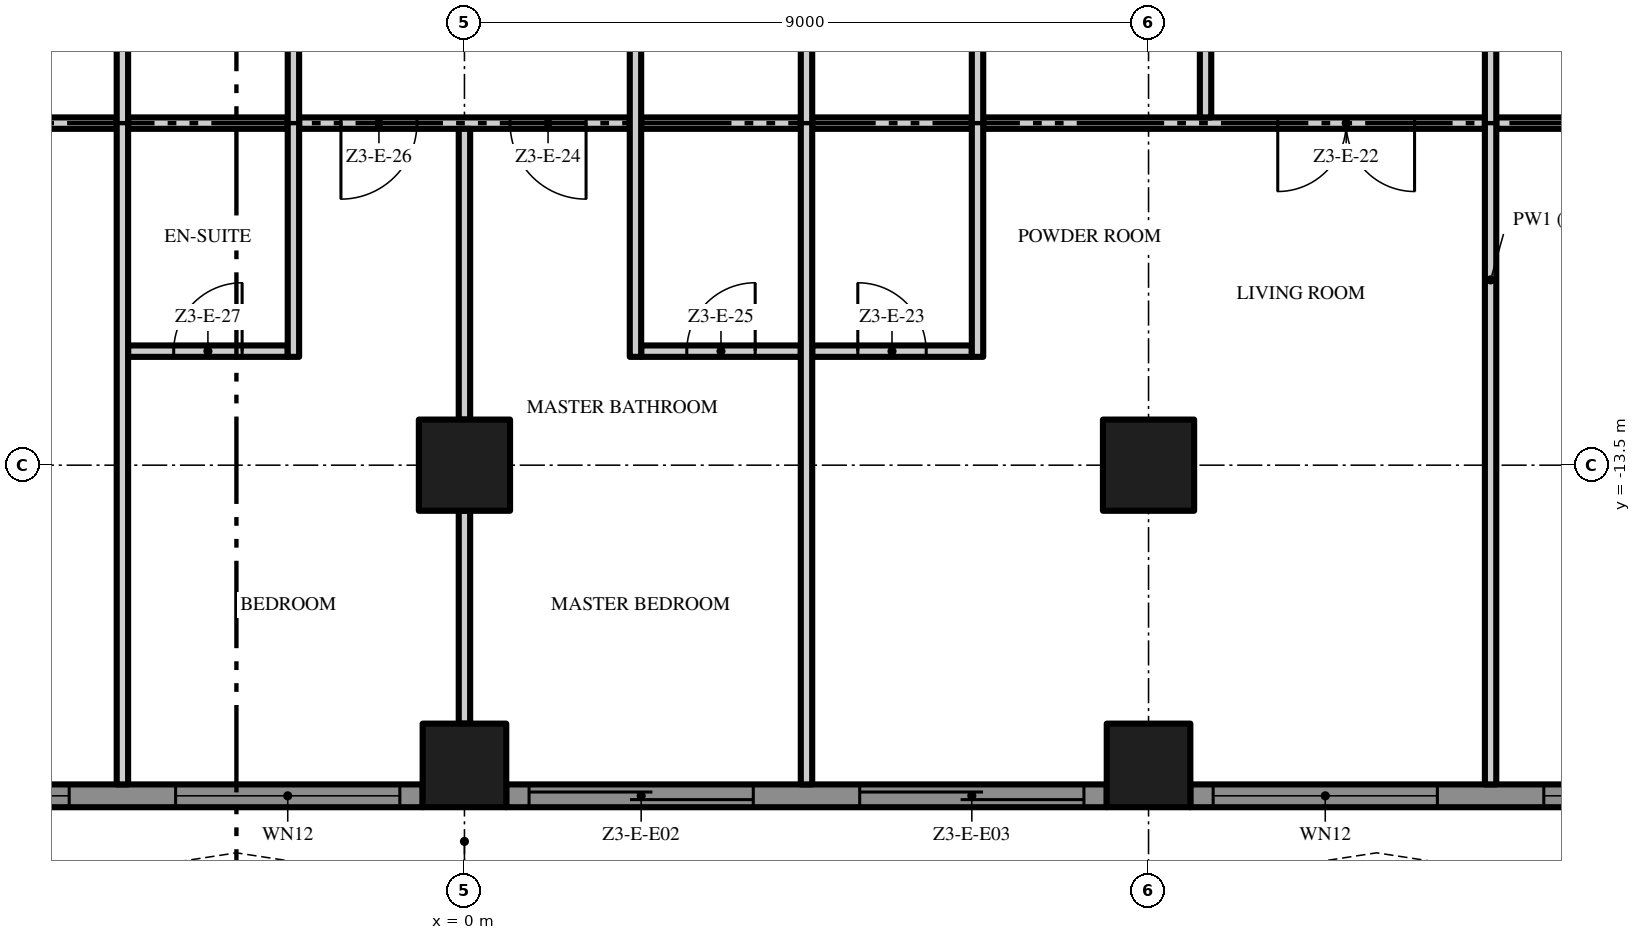
"""IFC4 building model, lengths in metres.
Left out: names, types, materials, properties, quantities, classifications, styles, units other than length and angle.
Written with IfcOpenShell. Run it as: python <this file> out.ifc"""

import sys

from ifc_helpers import new_model, si_unit, direction, frame, frame_2d, origin, origin_2d, place, context, subcontext, project, spatial, polyline, rectangle, outline, extrude, element, fill, save


model = new_model("IFC4")
c1 = context("Model", 3, precision=1e-05, world=origin(), true_north=direction((0.0, 1.0)))
c2 = subcontext(c1, "Body", "Model", "MODEL_VIEW")
j1 = project(units=[si_unit("LENGTHUNIT", "METRE"), si_unit("PLANEANGLEUNIT", "RADIAN")], contexts=[c1])
p1 = place(None, origin())
s1 = spatial("IfcSite", under=j1, at=p1, CompositionType="ELEMENT")
p2 = place(p1, origin())
s2 = spatial("IfcBuilding", under=s1, at=p2, CompositionType="ELEMENT")
p3 = place(p2, frame((0.0, 0.0, 166.8)))
s3 = spatial("IfcBuildingStorey", under=s2, at=p3, CompositionType="ELEMENT", Elevation=166.8)
p4 = place(p3, frame((0.0, -13.5, 0.0), z_axis=(0.0, 0.0, 1.0), x_axis=(1.0, 0.0, 0.0)))
e1 = element("IfcColumn", 1, at=p4, inside=s3, PredefinedType="COLUMN", context=c2, shape_type="SweptSolid", body=[
    extrude(rectangle(XDim=1.2, YDim=1.2, at=origin_2d()), origin(), (0.0, 0.0, 1.0), 3.5),
])
p5 = place(p3, frame((0.0, -17.45, 0.0), z_axis=(0.0, 0.0, 1.0), x_axis=(1.0, 0.0, 0.0)))
e2 = element("IfcColumn", 2, at=p5, inside=s3, PredefinedType="COLUMN", context=c2, shape_type="SweptSolid", body=[
    extrude(rectangle(XDim=1.1, YDim=1.1, at=origin_2d()), origin(), (0.0, 0.0, 1.0), 3.5),
])
p6 = place(p3, frame((9.0, -13.5, 0.0), z_axis=(0.0, 0.0, 1.0), x_axis=(1.0, 0.0, 0.0)))
e3 = element("IfcColumn", 3, at=p6, inside=s3, PredefinedType="COLUMN", context=c2, shape_type="SweptSolid", body=[
    extrude(rectangle(XDim=1.2, YDim=1.2, at=origin_2d()), origin(), (0.0, 0.0, 1.0), 3.5),
])
p7 = place(p3, frame((9.0, -17.45, 0.0), z_axis=(0.0, 0.0, 1.0), x_axis=(1.0, 0.0, 0.0)))
e4 = element("IfcColumn", 4, at=p7, inside=s3, PredefinedType="COLUMN", context=c2, shape_type="SweptSolid", body=[
    extrude(rectangle(XDim=1.1, YDim=1.1, at=origin_2d()), origin(), (0.0, 0.0, 1.0), 3.5),
])
p8 = place(p3, frame((-0.55, -17.85, 0.0), z_axis=(0.0, 0.0, 1.0), x_axis=(-1.0, 0.0, 0.0)))
e5 = element("IfcWall", 5, at=p8, inside=s3, PredefinedType="SOLIDWALL", context=c2, shape_type="SweptSolid", body=[
    extrude(rectangle(XDim=7.9, YDim=0.3, at=frame_2d((3.95, 0.0))), origin(), (0.0, 0.0, 1.0), 3.5),
])
p9 = place(p8, frame((4.65, 0.0, 0.45)))
e6 = element("IfcOpeningElement", 6, at=p9, cuts=e5, PredefinedType="OPENING", context=c2, shape_type="SweptSolid", body=[
    extrude(rectangle(XDim=2.95, YDim=2.65, at=frame_2d((1.475, 1.325))), frame((0.0, 0.16, 0.0), z_axis=(0.0, -1.0, 0.0), x_axis=(1.0, 0.0, 0.0)), (0.0, 0.0, 1.0), 0.32),
])
p10 = place(p8, frame((0.3, 0.0, 0.45)))
e7 = element("IfcOpeningElement", 7, at=p10, cuts=e5, PredefinedType="OPENING", context=c2, shape_type="SweptSolid", body=[
    extrude(rectangle(XDim=2.95, YDim=2.65, at=frame_2d((1.475, 1.325))), frame((0.0, 0.16, 0.0), z_axis=(0.0, -1.0, 0.0), x_axis=(1.0, 0.0, 0.0)), (0.0, 0.0, 1.0), 0.32),
])
p11 = place(p3, frame((8.45, -17.85, 0.0), z_axis=(0.0, 0.0, 1.0), x_axis=(-1.0, 0.0, 0.0)))
e8 = element("IfcWall", 8, at=p11, inside=s3, PredefinedType="SOLIDWALL", context=c2, shape_type="SweptSolid", body=[
    extrude(rectangle(XDim=7.9, YDim=0.3, at=frame_2d((3.95, 0.0))), origin(), (0.0, 0.0, 1.0), 3.5),
])
p12 = place(p11, frame((4.65, 0.0, 0.0)))
e9 = element("IfcOpeningElement", 9, at=p12, cuts=e8, PredefinedType="OPENING", context=c2, shape_type="SweptSolid", body=[
    extrude(rectangle(XDim=2.95, YDim=2.4, at=frame_2d((1.475, 1.2))), frame((0.0, 0.16, 0.0), z_axis=(0.0, -1.0, 0.0), x_axis=(1.0, 0.0, 0.0)), (0.0, 0.0, 1.0), 0.32),
])
p13 = place(p11, frame((0.3, 0.0, 0.0)))
e10 = element("IfcOpeningElement", 10, at=p13, cuts=e8, PredefinedType="OPENING", context=c2, shape_type="SweptSolid", body=[
    extrude(rectangle(XDim=2.95, YDim=2.4, at=frame_2d((1.475, 1.2))), frame((0.0, 0.16, 0.0), z_axis=(0.0, -1.0, 0.0), x_axis=(1.0, 0.0, 0.0)), (0.0, 0.0, 1.0), 0.32),
])
p14 = place(p3, frame((16.9, -17.85, 0.0), z_axis=(0.0, 0.0, 1.0), x_axis=(-1.0, 0.0, 0.0)))
e11 = element("IfcWall", 11, at=p14, inside=s3, PredefinedType="SOLIDWALL", context=c2, shape_type="SweptSolid", body=[
    extrude(rectangle(XDim=7.35, YDim=0.3, at=frame_2d((3.675, 0.0))), origin(), (0.0, 0.0, 1.0), 3.5),
])
p15 = place(p14, frame((4.1, 0.0, 0.45)))
e12 = element("IfcOpeningElement", 12, at=p15, cuts=e11, PredefinedType="OPENING", context=c2, shape_type="SweptSolid", body=[
    extrude(rectangle(XDim=2.95, YDim=2.65, at=frame_2d((1.475, 1.325))), frame((0.0, 0.16, 0.0), z_axis=(0.0, -1.0, 0.0), x_axis=(1.0, 0.0, 0.0)), (0.0, 0.0, 1.0), 0.32),
])
p16 = place(p14, frame((0.3, 0.0, 0.45)))
e13 = element("IfcOpeningElement", 13, at=p16, cuts=e11, PredefinedType="OPENING", context=c2, shape_type="SweptSolid", body=[
    extrude(rectangle(XDim=2.4, YDim=2.65, at=frame_2d((1.2, 1.325))), frame((0.0, 0.16, 0.0), z_axis=(0.0, -1.0, 0.0), x_axis=(1.0, 0.0, 0.0)), (0.0, 0.0, 1.0), 0.32),
])
p17 = place(p3, origin())
e14 = element("IfcWall", 14, at=p17, inside=s3, PredefinedType="USERDEFINED", context=c2, shape_type="SweptSolid", body=[
    extrude(outline(polyline([(-18.0, -18.6), (-16.5, -18.829), (-15.0, -19.429), (-13.5, -20.171), (-12.0, -20.771), (-10.5, -21.0), (-9.0, -20.771), (-7.5, -20.171), (-6.0, -19.429), (-4.5, -18.829), (-3.0, -18.6), (-1.5, -18.829), (0.0, -19.429), (1.5, -20.171), (3.0, -20.771), (4.5, -21.0), (6.0, -20.771), (7.5, -20.171), (9.0, -19.429), (10.5, -18.829), (12.0, -18.6), (13.5, -18.829), (15.0, -19.429), (16.5, -20.171), (18.0, -20.771), (18.093, -20.539), (16.602, -19.942), (15.102, -19.201), (13.566, -18.586), (12.0, -18.347), (10.434, -18.586), (8.898, -19.201), (7.398, -19.942), (5.934, -20.528), (4.5, -20.747), (3.066, -20.528), (1.602, -19.942), (0.102, -19.201), (-1.434, -18.586), (-3.0, -18.347), (-4.566, -18.586), (-6.102, -19.201), (-7.602, -19.942), (-9.066, -20.528), (-10.5, -20.747), (-11.934, -20.528), (-13.398, -19.942), (-14.898, -19.201), (-16.434, -18.586), (-17.962, -18.353), (-18.0, -18.6)])), origin(), (0.0, 0.0, 1.0), 0.9),
])
p18 = place(p3, frame((-4.425, -12.0, 0.0), z_axis=(0.0, 0.0, 1.0), x_axis=(1.0, 0.0, 0.0)))
e15 = element("IfcWall", 15, at=p18, inside=s3, PredefinedType="PARTITIONING", context=c2, shape_type="SweptSolid", body=[
    extrude(rectangle(XDim=2.1, YDim=0.15, at=frame_2d((1.05, 0.0))), origin(), (0.0, 0.0, 1.0), 3.5),
])
p19 = place(p18, frame((0.6, 0.0, 0.0)))
e16 = element("IfcOpeningElement", 16, at=p19, cuts=e15, PredefinedType="OPENING", context=c2, shape_type="SweptSolid", body=[
    extrude(rectangle(XDim=0.9, YDim=2.1, at=frame_2d((0.45, 1.05))), frame((0.0, 0.085, 0.0), z_axis=(0.0, -1.0, 0.0), x_axis=(1.0, 0.0, 0.0)), (0.0, 0.0, 1.0), 0.17),
])
p20 = place(p3, frame((2.325, -12.0, 0.0), z_axis=(0.0, 0.0, 1.0), x_axis=(1.0, 0.0, 0.0)))
e17 = element("IfcWall", 17, at=p20, inside=s3, PredefinedType="PARTITIONING", context=c2, shape_type="SweptSolid", body=[
    extrude(rectangle(XDim=2.1, YDim=0.15, at=frame_2d((1.05, 0.0))), origin(), (0.0, 0.0, 1.0), 3.5),
])
p21 = place(p20, frame((0.6, 0.0, 0.0)))
e18 = element("IfcOpeningElement", 18, at=p21, cuts=e17, PredefinedType="OPENING", context=c2, shape_type="SweptSolid", body=[
    extrude(rectangle(XDim=0.9, YDim=2.1, at=frame_2d((0.45, 1.05))), frame((0.0, 0.085, 0.0), z_axis=(0.0, -1.0, 0.0), x_axis=(1.0, 0.0, 0.0)), (0.0, 0.0, 1.0), 0.17),
])
p22 = place(p3, frame((4.575, -12.0, 0.0), z_axis=(0.0, 0.0, 1.0), x_axis=(1.0, 0.0, 0.0)))
e19 = element("IfcWall", 19, at=p22, inside=s3, PredefinedType="PARTITIONING", context=c2, shape_type="SweptSolid", body=[
    extrude(rectangle(XDim=2.1, YDim=0.15, at=frame_2d((1.05, 0.0))), origin(), (0.0, 0.0, 1.0), 3.5),
])
p23 = place(p22, frame((0.6, 0.0, 0.0)))
e20 = element("IfcOpeningElement", 20, at=p23, cuts=e19, PredefinedType="OPENING", context=c2, shape_type="SweptSolid", body=[
    extrude(rectangle(XDim=0.9, YDim=2.1, at=frame_2d((0.45, 1.05))), frame((0.0, 0.085, 0.0), z_axis=(0.0, -1.0, 0.0), x_axis=(1.0, 0.0, 0.0)), (0.0, 0.0, 1.0), 0.17),
])
p24 = place(p3, frame((-4.575, -9.0, 0.0), z_axis=(0.0, 0.0, 1.0), x_axis=(-1.0, 0.0, 0.0)))
e21 = element("IfcWall", 21, at=p24, inside=s3, PredefinedType="PARTITIONING", context=c2, shape_type="SweptSolid", body=[
    extrude(rectangle(XDim=8.85, YDim=0.15, at=frame_2d((4.425, 0.0))), origin(), (0.0, 0.0, 1.0), 3.5),
])
p25 = place(p24, frame((1.075, 0.0, 0.0)))
e22 = element("IfcOpeningElement", 22, at=p25, cuts=e21, PredefinedType="OPENING", context=c2, shape_type="SweptSolid", body=[
    extrude(rectangle(XDim=1.5, YDim=2.4, at=frame_2d((0.75, 1.2))), frame((0.0, 0.085, 0.0), z_axis=(0.0, -1.0, 0.0), x_axis=(1.0, 0.0, 0.0)), (0.0, 0.0, 1.0), 0.17),
])
p26 = place(p3, frame((-4.425, -9.0, 0.0), z_axis=(0.0, 0.0, 1.0), x_axis=(1.0, 0.0, 0.0)))
e23 = element("IfcWall", 23, at=p26, inside=s3, PredefinedType="PARTITIONING", context=c2, shape_type="SweptSolid", body=[
    extrude(rectangle(XDim=2.1, YDim=0.15, at=frame_2d((1.05, 0.0))), origin(), (0.0, 0.0, 1.0), 3.5),
])
p27 = place(p3, frame((2.175, -9.0, 0.0), z_axis=(0.0, 0.0, 1.0), x_axis=(-1.0, 0.0, 0.0)))
e24 = element("IfcWall", 24, at=p27, inside=s3, PredefinedType="PARTITIONING", context=c2, shape_type="SweptSolid", body=[
    extrude(rectangle(XDim=4.35, YDim=0.15, at=frame_2d((2.175, 0.0))), origin(), (0.0, 0.0, 1.0), 3.5),
])
p28 = place(p27, frame((0.575, 0.0, 0.0)))
e25 = element("IfcOpeningElement", 25, at=p28, cuts=e24, PredefinedType="OPENING", context=c2, shape_type="SweptSolid", body=[
    extrude(rectangle(XDim=1.0, YDim=2.4, at=frame_2d((0.5, 1.2))), frame((0.0, 0.085, 0.0), z_axis=(0.0, -1.0, 0.0), x_axis=(1.0, 0.0, 0.0)), (0.0, 0.0, 1.0), 0.17),
])
p29 = place(p27, frame((2.8, 0.0, 0.0)))
e26 = element("IfcOpeningElement", 26, at=p29, cuts=e24, PredefinedType="OPENING", context=c2, shape_type="SweptSolid", body=[
    extrude(rectangle(XDim=1.0, YDim=2.4, at=frame_2d((0.5, 1.2))), frame((0.0, 0.085, 0.0), z_axis=(0.0, -1.0, 0.0), x_axis=(1.0, 0.0, 0.0)), (0.0, 0.0, 1.0), 0.17),
])
for number, where, z_axis, x_axis in (
    (27, (2.325, -9.0, 0.0), (0.0, 0.0, 1.0), (1.0, 0.0, 0.0)),
    (28, (4.575, -9.0, 0.0), (0.0, 0.0, 1.0), (1.0, 0.0, 0.0)),
):
    element("IfcWall", number, at=place(p3, frame(where, z_axis=z_axis, x_axis=x_axis)), inside=s3, PredefinedType="PARTITIONING", context=c2, shape_type="SweptSolid", body=[
        extrude(rectangle(XDim=2.1, YDim=0.15, at=frame_2d((1.05, 0.0))), origin(), (0.0, 0.0, 1.0), 3.5),
    ])
p30 = place(p3, frame((13.425, -9.0, 0.0), z_axis=(0.0, 0.0, 1.0), x_axis=(-1.0, 0.0, 0.0)))
e29 = element("IfcWall", 29, at=p30, inside=s3, PredefinedType="PARTITIONING", context=c2, shape_type="SweptSolid", body=[
    extrude(rectangle(XDim=6.6, YDim=0.15, at=frame_2d((3.3, 0.0))), origin(), (0.0, 0.0, 1.0), 3.5),
])
p31 = place(p30, frame((0.925, 0.0, 0.0)))
e30 = element("IfcOpeningElement", 30, at=p31, cuts=e29, PredefinedType="OPENING", context=c2, shape_type="SweptSolid", body=[
    extrude(rectangle(XDim=1.8, YDim=2.4, at=frame_2d((0.9, 1.2))), frame((0.0, 0.085, 0.0), z_axis=(0.0, -1.0, 0.0), x_axis=(1.0, 0.0, 0.0)), (0.0, 0.0, 1.0), 0.17),
])
p32 = place(p3, frame((22.2, -9.0, 0.0), z_axis=(0.0, 0.0, 1.0), x_axis=(-1.0, 0.0, 0.0)))
e31 = element("IfcWall", 31, at=p32, inside=s3, PredefinedType="PARTITIONING", context=c2, shape_type="SweptSolid", body=[
    extrude(rectangle(XDim=8.625, YDim=0.15, at=frame_2d((4.312, 0.0))), origin(), (0.0, 0.0, 1.0), 3.5),
])
p33 = place(p32, frame((0.8, 0.0, 0.0)))
e32 = element("IfcOpeningElement", 32, at=p33, cuts=e31, PredefinedType="OPENING", context=c2, shape_type="SweptSolid", body=[
    extrude(rectangle(XDim=1.5, YDim=2.4, at=frame_2d((0.75, 1.2))), frame((0.0, 0.085, 0.0), z_axis=(0.0, -1.0, 0.0), x_axis=(1.0, 0.0, 0.0)), (0.0, 0.0, 1.0), 0.17),
])
p34 = place(p3, frame((-4.5, -17.7, 0.0), z_axis=(0.0, 0.0, 1.0), x_axis=(0.0, 1.0, 0.0)))
e33 = element("IfcWall", 33, at=p34, inside=s3, PredefinedType="PARTITIONING", context=c2, shape_type="SweptSolid", body=[
    extrude(rectangle(XDim=13.275, YDim=0.15, at=frame_2d((6.638, 0.0))), origin(), (0.0, 0.0, 1.0), 3.5),
])
p35 = place(p3, frame((-2.25, -12.075, 0.0), z_axis=(0.0, 0.0, 1.0), x_axis=(0.0, 1.0, 0.0)))
e34 = element("IfcWall", 34, at=p35, inside=s3, PredefinedType="PARTITIONING", context=c2, shape_type="SweptSolid", body=[
    extrude(rectangle(XDim=7.65, YDim=0.15, at=frame_2d((3.825, 0.0))), origin(), (0.0, 0.0, 1.0), 3.5),
])
p36 = place(p3, frame((0.0, -16.9, 0.0), z_axis=(0.0, 0.0, 1.0), x_axis=(0.0, 1.0, 0.0)))
e35 = element("IfcWall", 35, at=p36, inside=s3, PredefinedType="PARTITIONING", context=c2, shape_type="SweptSolid", body=[
    extrude(rectangle(XDim=2.8, YDim=0.15, at=frame_2d((1.4, 0.0))), origin(), (0.0, 0.0, 1.0), 3.5),
])
p37 = place(p3, frame((0.0, -12.9, 0.0), z_axis=(0.0, 0.0, 1.0), x_axis=(0.0, 1.0, 0.0)))
e36 = element("IfcWall", 36, at=p37, inside=s3, PredefinedType="PARTITIONING", context=c2, shape_type="SweptSolid", body=[
    extrude(rectangle(XDim=3.825, YDim=0.15, at=frame_2d((1.913, 0.0))), origin(), (0.0, 0.0, 1.0), 3.5),
])
p38 = place(p3, frame((2.25, -4.425, 0.0), z_axis=(0.0, 0.0, 1.0), x_axis=(0.0, -1.0, 0.0)))
e37 = element("IfcWall", 37, at=p38, inside=s3, PredefinedType="PARTITIONING", context=c2, shape_type="SweptSolid", body=[
    extrude(rectangle(XDim=7.65, YDim=0.15, at=frame_2d((3.825, 0.0))), origin(), (0.0, 0.0, 1.0), 3.5),
])
p39 = place(p38, frame((1.875, 0.0, 0.0)))
e38 = element("IfcOpeningElement", 38, at=p39, cuts=e37, PredefinedType="OPENING", context=c2, shape_type="SweptSolid", body=[
    extrude(rectangle(XDim=0.9, YDim=2.1, at=frame_2d((0.45, 1.05))), frame((0.0, 0.085, 0.0), z_axis=(0.0, -1.0, 0.0), x_axis=(1.0, 0.0, 0.0)), (0.0, 0.0, 1.0), 0.17),
])
p40 = place(p3, frame((4.5, -17.7, 0.0), z_axis=(0.0, 0.0, 1.0), x_axis=(0.0, 1.0, 0.0)))
e39 = element("IfcWall", 39, at=p40, inside=s3, PredefinedType="PARTITIONING", context=c2, shape_type="SweptSolid", body=[
    extrude(rectangle(XDim=13.125, YDim=0.15, at=frame_2d((6.562, 0.0))), origin(), (0.0, 0.0, 1.0), 3.5),
])
p41 = place(p3, frame((6.75, -12.075, 0.0), z_axis=(0.0, 0.0, 1.0), x_axis=(0.0, 1.0, 0.0)))
e40 = element("IfcWall", 40, at=p41, inside=s3, PredefinedType="PARTITIONING", context=c2, shape_type="SweptSolid", body=[
    extrude(rectangle(XDim=7.5, YDim=0.15, at=frame_2d((3.75, 0.0))), origin(), (0.0, 0.0, 1.0), 3.5),
])
p42 = place(p3, frame((9.75, -8.925, 0.0), z_axis=(0.0, 0.0, 1.0), x_axis=(0.0, 1.0, 0.0)))
e41 = element("IfcWall", 41, at=p42, inside=s3, PredefinedType="PARTITIONING", context=c2, shape_type="SweptSolid", body=[
    extrude(rectangle(XDim=4.5, YDim=0.15, at=frame_2d((2.25, 0.0))), origin(), (0.0, 0.0, 1.0), 3.5),
])
p43 = place(p3, frame((13.5, -17.7, 0.0), z_axis=(0.0, 0.0, 1.0), x_axis=(0.0, 1.0, 0.0)))
e42 = element("IfcWall", 42, at=p43, inside=s3, PredefinedType="PARTITIONING", context=c2, shape_type="SweptSolid", body=[
    extrude(rectangle(XDim=13.275, YDim=0.15, at=frame_2d((6.638, 0.0))), origin(), (0.0, 0.0, 1.0), 3.5),
])
p44 = place(p9, origin())
e43 = element("IfcWindow", 43, at=p44, inside=s3, PartitioningType="SINGLE_PANEL", PredefinedType="WINDOW", context=c2, shape_type="SweptSolid", body=[
    extrude(rectangle(XDim=2.95, YDim=2.65, at=frame_2d((1.475, 1.325))), frame((0.0, 0.03, 0.0), z_axis=(0.0, -1.0, 0.0), x_axis=(1.0, 0.0, 0.0)), (0.0, 0.0, 1.0), 0.06),
])
fill(e6, e43)
p45 = place(p10, origin())
e44 = element("IfcWindow", 44, at=p45, inside=s3, PartitioningType="SINGLE_PANEL", PredefinedType="WINDOW", context=c2, shape_type="SweptSolid", body=[
    extrude(rectangle(XDim=2.95, YDim=2.65, at=frame_2d((1.475, 1.325))), frame((0.0, 0.03, 0.0), z_axis=(0.0, -1.0, 0.0), x_axis=(1.0, 0.0, 0.0)), (0.0, 0.0, 1.0), 0.06),
])
fill(e7, e44)
p46 = place(p12, origin())
e45 = element("IfcDoor", 45, at=p46, inside=s3, OperationType="SINGLE_SWING_LEFT", PredefinedType="DOOR", context=c2, shape_type="SweptSolid", body=[
    extrude(rectangle(XDim=2.95, YDim=2.4, at=frame_2d((1.475, 1.2))), frame((0.0, 0.025, 0.0), z_axis=(0.0, -1.0, 0.0), x_axis=(1.0, 0.0, 0.0)), (0.0, 0.0, 1.0), 0.05),
])
fill(e9, e45)
p47 = place(p13, origin())
e46 = element("IfcDoor", 46, at=p47, inside=s3, OperationType="SINGLE_SWING_LEFT", PredefinedType="DOOR", context=c2, shape_type="SweptSolid", body=[
    extrude(rectangle(XDim=2.95, YDim=2.4, at=frame_2d((1.475, 1.2))), frame((0.0, 0.025, 0.0), z_axis=(0.0, -1.0, 0.0), x_axis=(1.0, 0.0, 0.0)), (0.0, 0.0, 1.0), 0.05),
])
fill(e10, e46)
p48 = place(p15, origin())
e47 = element("IfcWindow", 47, at=p48, inside=s3, PartitioningType="SINGLE_PANEL", PredefinedType="WINDOW", context=c2, shape_type="SweptSolid", body=[
    extrude(rectangle(XDim=2.95, YDim=2.65, at=frame_2d((1.475, 1.325))), frame((0.0, 0.03, 0.0), z_axis=(0.0, -1.0, 0.0), x_axis=(1.0, 0.0, 0.0)), (0.0, 0.0, 1.0), 0.06),
])
fill(e12, e47)
p49 = place(p16, origin())
e48 = element("IfcWindow", 48, at=p49, inside=s3, PartitioningType="SINGLE_PANEL", PredefinedType="WINDOW", context=c2, shape_type="SweptSolid", body=[
    extrude(rectangle(XDim=2.4, YDim=2.65, at=frame_2d((1.2, 1.325))), frame((0.0, 0.03, 0.0), z_axis=(0.0, -1.0, 0.0), x_axis=(1.0, 0.0, 0.0)), (0.0, 0.0, 1.0), 0.06),
])
fill(e13, e48)
p50 = place(p31, origin())
e49 = element("IfcDoor", 49, at=p50, inside=s3, OperationType="DOUBLE_DOOR_SINGLE_SWING", PredefinedType="DOOR", context=c2, shape_type="SweptSolid", body=[
    extrude(rectangle(XDim=1.8, YDim=2.4, at=frame_2d((0.9, 1.2))), frame((0.0, 0.025, 0.0), z_axis=(0.0, -1.0, 0.0), x_axis=(1.0, 0.0, 0.0)), (0.0, 0.0, 1.0), 0.05),
])
fill(e30, e49)
p51 = place(p23, origin())
e50 = element("IfcDoor", 50, at=p51, inside=s3, OperationType="SINGLE_SWING_LEFT", PredefinedType="DOOR", context=c2, shape_type="SweptSolid", body=[
    extrude(rectangle(XDim=0.9, YDim=2.1, at=frame_2d((0.45, 1.05))), frame((0.0, 0.025, 0.0), z_axis=(0.0, -1.0, 0.0), x_axis=(1.0, 0.0, 0.0)), (0.0, 0.0, 1.0), 0.05),
])
fill(e20, e50)
p52 = place(p28, origin())
e51 = element("IfcDoor", 51, at=p52, inside=s3, OperationType="SINGLE_SWING_LEFT", PredefinedType="DOOR", context=c2, shape_type="SweptSolid", body=[
    extrude(rectangle(XDim=1.0, YDim=2.4, at=frame_2d((0.5, 1.2))), frame((0.0, 0.025, 0.0), z_axis=(0.0, -1.0, 0.0), x_axis=(1.0, 0.0, 0.0)), (0.0, 0.0, 1.0), 0.05),
])
fill(e25, e51)
p53 = place(p21, origin())
e52 = element("IfcDoor", 52, at=p53, inside=s3, OperationType="SINGLE_SWING_RIGHT", PredefinedType="DOOR", context=c2, shape_type="SweptSolid", body=[
    extrude(rectangle(XDim=0.9, YDim=2.1, at=frame_2d((0.45, 1.05))), frame((0.0, 0.025, 0.0), z_axis=(0.0, -1.0, 0.0), x_axis=(1.0, 0.0, 0.0)), (0.0, 0.0, 1.0), 0.05),
])
fill(e18, e52)
p54 = place(p29, origin())
e53 = element("IfcDoor", 53, at=p54, inside=s3, OperationType="SINGLE_SWING_RIGHT", PredefinedType="DOOR", context=c2, shape_type="SweptSolid", body=[
    extrude(rectangle(XDim=1.0, YDim=2.4, at=frame_2d((0.5, 1.2))), frame((0.0, 0.025, 0.0), z_axis=(0.0, -1.0, 0.0), x_axis=(1.0, 0.0, 0.0)), (0.0, 0.0, 1.0), 0.05),
])
fill(e26, e53)
p55 = place(p19, origin())
e54 = element("IfcDoor", 54, at=p55, inside=s3, OperationType="SINGLE_SWING_RIGHT", PredefinedType="DOOR", context=c2, shape_type="SweptSolid", body=[
    extrude(rectangle(XDim=0.9, YDim=2.1, at=frame_2d((0.45, 1.05))), frame((0.0, 0.025, 0.0), z_axis=(0.0, -1.0, 0.0), x_axis=(1.0, 0.0, 0.0)), (0.0, 0.0, 1.0), 0.05),
])
fill(e16, e54)
save(model, sys.argv[1])
